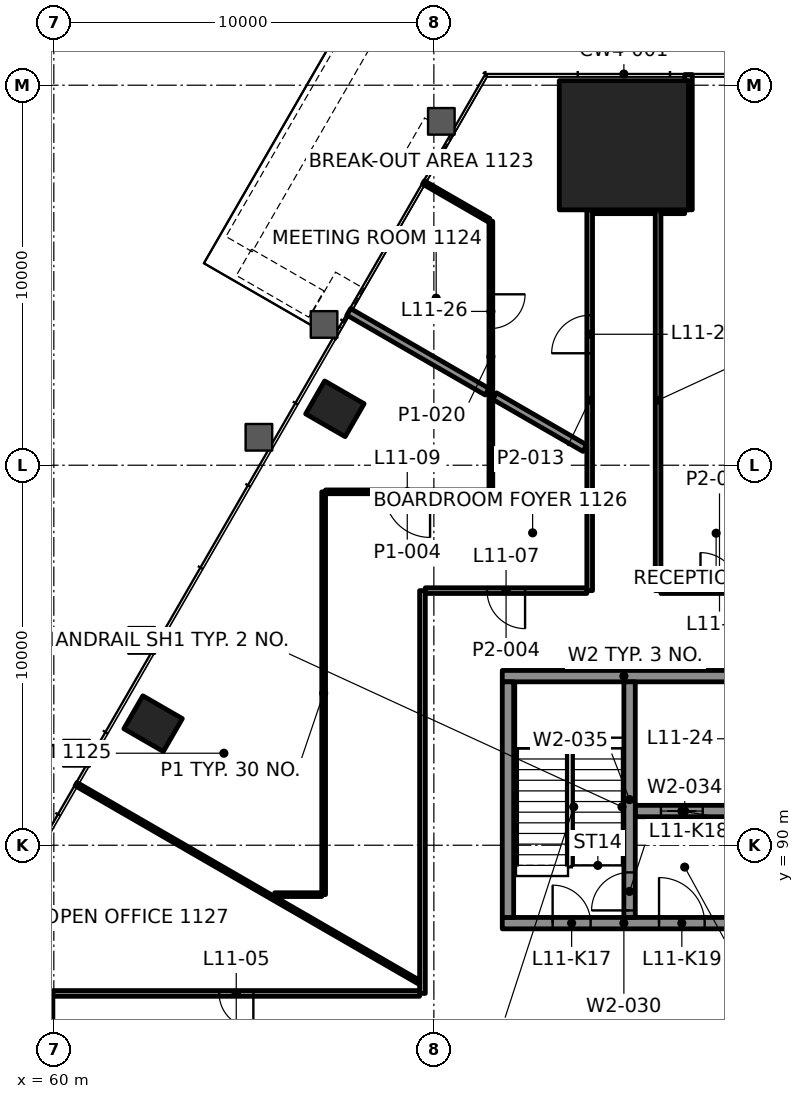
"""IFC4 building model, lengths in metres.
Left out: names, types, materials, properties, quantities, classifications, styles, units other than length and angle.
Written with IfcOpenShell. Run it as: python <this file> out.ifc"""

import sys

from ifc_helpers import new_model, si_unit, direction, frame, frame_2d, origin, origin_2d, place, context, subcontext, project, spatial, rectangle, extrude, element, fill, save


model = new_model("IFC4")
c1 = context("Model", 3, precision=1e-05, world=origin(), true_north=direction((0.0, 1.0)))
c2 = subcontext(c1, "Body", "Model", "MODEL_VIEW")
j1 = project(units=[si_unit("LENGTHUNIT", "METRE"), si_unit("PLANEANGLEUNIT", "RADIAN")], contexts=[c1])
p1 = place(None, origin())
s1 = spatial("IfcSite", under=j1, at=p1, CompositionType="ELEMENT")
p2 = place(p1, origin())
s2 = spatial("IfcBuilding", under=s1, at=p2, CompositionType="ELEMENT")
p3 = place(p2, frame((0.0, 0.0, 52.6)))
s3 = spatial("IfcBuildingStorey", under=s2, at=p3, CompositionType="ELEMENT", Elevation=52.6)
p4 = place(p3, frame((75.0, 108.42, 0.0), z_axis=(0.0, 0.0, 1.0), x_axis=(-1.0, 0.0, 0.0)))
e1 = element("IfcColumn", 1, at=p4, inside=s3, PredefinedType="COLUMN", context=c2, shape_type="SweptSolid", body=[
    extrude(rectangle(XDim=3.4, YDim=3.4, at=origin_2d()), origin(), (0.0, 0.0, 1.0), 4.2),
])
for number, where, z_axis, x_axis in (
    (2, (67.396, 101.485, -0.0), (0.0, 0.0, 1.0), (-0.5, -0.866, 0.0)),
    (3, (62.612, 93.199, -0.0), (0.0, 0.0, 1.0), (-0.5, -0.866, 0.0)),
):
    element("IfcColumn", number, at=place(p3, frame(where, z_axis=z_axis, x_axis=x_axis)), inside=s3, PredefinedType="COLUMN", context=c2, shape_type="SweptSolid", body=[
        extrude(rectangle(XDim=1.0, YDim=1.2, at=origin_2d()), origin(), (0.0, 0.0, 1.0), 4.2),
    ])
p5 = place(p3, frame((71.8, 87.95, 0.0), z_axis=(0.0, 0.0, 1.0), x_axis=(1.0, 0.0, 0.0)))
e4 = element("IfcWall", 4, at=p5, inside=s3, PredefinedType="SHEAR", context=c2, shape_type="SweptSolid", body=[
    extrude(rectangle(XDim=6.4, YDim=0.3, at=frame_2d((3.2, 0.0))), origin(), (0.0, 0.0, 1.0), 4.0),
])
p6 = place(p5, frame((1.325, 0.0, 0.0)))
e5 = element("IfcOpeningElement", 5, at=p6, cuts=e4, PredefinedType="OPENING", context=c2, shape_type="SweptSolid", body=[
    extrude(rectangle(XDim=1.0, YDim=2.1, at=frame_2d((0.5, 1.05))), frame((0.0, 0.16, 0.0), z_axis=(0.0, -1.0, 0.0), x_axis=(1.0, 0.0, 0.0)), (0.0, 0.0, 1.0), 0.32),
])
p7 = place(p5, frame((4.125, 0.0, 0.0)))
e6 = element("IfcOpeningElement", 6, at=p7, cuts=e4, PredefinedType="OPENING", context=c2, shape_type="SweptSolid", body=[
    extrude(rectangle(XDim=1.2, YDim=2.1, at=frame_2d((0.6, 1.05))), frame((0.0, 0.16, 0.0), z_axis=(0.0, -1.0, 0.0), x_axis=(1.0, 0.0, 0.0)), (0.0, 0.0, 1.0), 0.32),
])
p8 = place(p3, frame((71.8, 94.45, 0.0), z_axis=(0.0, 0.0, 1.0), x_axis=(1.0, 0.0, 0.0)))
e7 = element("IfcWall", 7, at=p8, inside=s3, PredefinedType="SHEAR", context=c2, shape_type="SweptSolid", body=[
    extrude(rectangle(XDim=6.4, YDim=0.3, at=frame_2d((3.2, 0.0))), origin(), (0.0, 0.0, 1.0), 4.0),
])
p9 = place(p3, frame((71.95, 88.1, 0.0), z_axis=(0.0, 0.0, 1.0), x_axis=(0.0, 1.0, 0.0)))
e8 = element("IfcWall", 8, at=p9, inside=s3, PredefinedType="SHEAR", context=c2, shape_type="SweptSolid", body=[
    extrude(rectangle(XDim=6.2, YDim=0.3, at=frame_2d((3.1, 0.0))), origin(), (0.0, 0.0, 1.0), 4.0),
])
p10 = place(p3, frame((75.3, 90.9, 0.0), z_axis=(0.0, 0.0, 1.0), x_axis=(1.0, 0.0, 0.0)))
e9 = element("IfcWall", 9, at=p10, inside=s3, PredefinedType="SHEAR", context=c2, shape_type="SweptSolid", body=[
    extrude(rectangle(XDim=2.6, YDim=0.3, at=frame_2d((1.3, 0.0))), origin(), (0.0, 0.0, 1.0), 4.0),
])
p11 = place(p10, frame((0.675, 0.0, 0.0)))
e10 = element("IfcOpeningElement", 10, at=p11, cuts=e9, PredefinedType="OPENING", context=c2, shape_type="SweptSolid", body=[
    extrude(rectangle(XDim=1.1, YDim=2.1, at=frame_2d((0.55, 1.05))), frame((0.0, 0.16, 0.0), z_axis=(0.0, -1.0, 0.0), x_axis=(1.0, 0.0, 0.0)), (0.0, 0.0, 1.0), 0.32),
])
p12 = place(p3, frame((75.15, 88.1, 0.0), z_axis=(0.0, 0.0, 1.0), x_axis=(0.0, 1.0, 0.0)))
e11 = element("IfcWall", 11, at=p12, inside=s3, PredefinedType="SHEAR", context=c2, shape_type="SweptSolid", body=[
    extrude(rectangle(XDim=6.2, YDim=0.3, at=frame_2d((3.1, 0.0))), origin(), (0.0, 0.0, 1.0), 4.0),
])
p13 = place(p12, frame((0.185, 0.0, 0.0)))
e12 = element("IfcOpeningElement", 12, at=p13, cuts=e11, PredefinedType="OPENING", context=c2, shape_type="SweptSolid", body=[
    extrude(rectangle(XDim=1.0, YDim=2.1, at=frame_2d((0.5, 1.05))), frame((0.0, 0.16, 0.0), z_axis=(0.0, -1.0, 0.0), x_axis=(1.0, 0.0, 0.0)), (0.0, 0.0, 1.0), 0.32),
])
p14 = place(p3, frame((69.625, 86.1, 0.0), z_axis=(0.0, 0.0, 1.0), x_axis=(-1.0, 0.0, 0.0)))
e13 = element("IfcWall", 13, at=p14, inside=s3, PredefinedType="PARTITIONING", context=c2, shape_type="SweptSolid", body=[
    extrude(rectangle(XDim=9.649, YDim=0.15, at=frame_2d((4.825, 0.0))), origin(), (0.0, 0.0, 1.0), 3.4),
])
p15 = place(p14, frame((4.375, 0.0, 0.0)))
e14 = element("IfcOpeningElement", 14, at=p15, cuts=e13, PredefinedType="OPENING", context=c2, shape_type="SweptSolid", body=[
    extrude(rectangle(XDim=0.9, YDim=2.1, at=frame_2d((0.45, 1.05))), frame((0.0, 0.085, 0.0), z_axis=(0.0, -1.0, 0.0), x_axis=(1.0, 0.0, 0.0)), (0.0, 0.0, 1.0), 0.17),
])
p16 = place(p3, frame((65.812, 88.7, 0.0), z_axis=(0.0, 0.0, 1.0), x_axis=(1.0, 0.0, 0.0)))
e15 = element("IfcWall", 15, at=p16, inside=s3, PredefinedType="PARTITIONING", context=c2, shape_type="SweptSolid", body=[
    extrude(rectangle(XDim=1.238, YDim=0.1, at=frame_2d((0.619, 0.0))), origin(), (0.0, 0.0, 1.0), 3.4),
])
p17 = place(p3, frame((74.025, 96.7, 0.0), z_axis=(0.0, 0.0, 1.0), x_axis=(-1.0, 0.0, 0.0)))
e16 = element("IfcWall", 16, at=p17, inside=s3, PredefinedType="PARTITIONING", context=c2, shape_type="SweptSolid", body=[
    extrude(rectangle(XDim=4.25, YDim=0.15, at=frame_2d((2.125, 0.0))), origin(), (0.0, 0.0, 1.0), 3.4),
])
p18 = place(p17, frame((1.625, 0.0, 0.0)))
e17 = element("IfcOpeningElement", 17, at=p18, cuts=e16, PredefinedType="OPENING", context=c2, shape_type="SweptSolid", body=[
    extrude(rectangle(XDim=1.0, YDim=2.1, at=frame_2d((0.5, 1.05))), frame((0.0, 0.085, 0.0), z_axis=(0.0, -1.0, 0.0), x_axis=(1.0, 0.0, 0.0)), (0.0, 0.0, 1.0), 0.17),
])
p19 = place(p3, frame((75.975, 96.7, 0.0), z_axis=(0.0, 0.0, 1.0), x_axis=(1.0, 0.0, 0.0)))
e18 = element("IfcWall", 18, at=p19, inside=s3, PredefinedType="PARTITIONING", context=c2, shape_type="SweptSolid", body=[
    extrude(rectangle(XDim=3.082, YDim=0.15, at=frame_2d((1.541, 0.0))), origin(), (0.0, 0.0, 1.0), 3.4),
])
p20 = place(p19, frame((1.041, 0.0, 0.0)))
e19 = element("IfcOpeningElement", 19, at=p20, cuts=e18, PredefinedType="OPENING", context=c2, shape_type="SweptSolid", body=[
    extrude(rectangle(XDim=1.0, YDim=2.1, at=frame_2d((0.5, 1.05))), frame((0.0, 0.085, 0.0), z_axis=(0.0, -1.0, 0.0), x_axis=(1.0, 0.0, 0.0)), (0.0, 0.0, 1.0), 0.17),
])
p21 = place(p3, frame((71.45, 99.3, 0.0), z_axis=(0.0, 0.0, 1.0), x_axis=(-1.0, 0.0, 0.0)))
e20 = element("IfcWall", 20, at=p21, inside=s3, PredefinedType="PARTITIONING", context=c2, shape_type="SweptSolid", body=[
    extrude(rectangle(XDim=4.3, YDim=0.1, at=frame_2d((2.15, 0.0))), origin(), (0.0, 0.0, 1.0), 3.4),
])
p22 = place(p21, frame((1.55, 0.0, 0.0)))
e21 = element("IfcOpeningElement", 21, at=p22, cuts=e20, PredefinedType="OPENING", context=c2, shape_type="SweptSolid", body=[
    extrude(rectangle(XDim=1.2, YDim=2.1, at=frame_2d((0.6, 1.05))), frame((0.0, 0.06, 0.0), z_axis=(0.0, -1.0, 0.0), x_axis=(1.0, 0.0, 0.0)), (0.0, 0.0, 1.0), 0.12),
])
p23 = place(p3, frame((74.176, 106.72, 0.0), z_axis=(0.0, 0.0, 1.0), x_axis=(1.0, 0.0, 0.0)))
e22 = element("IfcWall", 22, at=p23, inside=s3, PredefinedType="PARTITIONING", context=c2, shape_type="SweptSolid", body=[
    extrude(rectangle(XDim=1.649, YDim=0.2, at=frame_2d((0.825, 0.0))), origin(), (0.0, 0.0, 1.0), 3.397),
])
p24 = place(p3, frame((76.7, 106.721, 0.0), z_axis=(0.0, 0.0, 1.0), x_axis=(0.0, 1.0, 0.0)))
e23 = element("IfcWall", 23, at=p24, inside=s3, PredefinedType="PARTITIONING", context=c2, shape_type="SweptSolid", body=[
    extrude(rectangle(XDim=3.56, YDim=0.2, at=frame_2d((1.78, 0.0))), origin(), (0.0, 0.0, 1.0), 3.4),
])
p25 = place(p3, frame((75.9, 96.7, 0.0), z_axis=(0.0, 0.0, 1.0), x_axis=(0.0, 1.0, 0.0)))
e24 = element("IfcWall", 24, at=p25, inside=s3, PredefinedType="PARTITIONING", context=c2, shape_type="SweptSolid", body=[
    extrude(rectangle(XDim=10.02, YDim=0.15, at=frame_2d((5.01, 0.0))), origin(), (0.0, 0.0, 1.0), 3.4),
])
p26 = place(p3, frame((74.1, 96.7, 0.0), z_axis=(0.0, 0.0, 1.0), x_axis=(0.0, 1.0, 0.0)))
e25 = element("IfcWall", 25, at=p26, inside=s3, PredefinedType="PARTITIONING", context=c2, shape_type="SweptSolid", body=[
    extrude(rectangle(XDim=10.02, YDim=0.15, at=frame_2d((5.01, 0.0))), origin(), (0.0, 0.0, 1.0), 3.4),
])
p27 = place(p26, frame((6.246, 0.0, 0.0)))
e26 = element("IfcOpeningElement", 26, at=p27, cuts=e25, PredefinedType="OPENING", context=c2, shape_type="SweptSolid", body=[
    extrude(rectangle(XDim=1.0, YDim=2.1, at=frame_2d((0.5, 1.05))), frame((0.0, 0.085, 0.0), z_axis=(0.0, -1.0, 0.0), x_axis=(1.0, 0.0, 0.0)), (0.0, 0.0, 1.0), 0.17),
])
p28 = place(p3, frame((71.5, 106.418, 0.0), z_axis=(0.0, 0.0, 1.0), x_axis=(0.0, -1.0, 0.0)))
e27 = element("IfcWall", 27, at=p28, inside=s3, PredefinedType="PARTITIONING", context=c2, shape_type="SweptSolid", body=[
    extrude(rectangle(XDim=7.118, YDim=0.1, at=frame_2d((3.559, 0.0))), origin(), (0.0, 0.0, 1.0), 3.4),
])
p29 = place(p28, frame((1.921, 0.0, 0.0)))
e28 = element("IfcOpeningElement", 28, at=p29, cuts=e27, PredefinedType="OPENING", context=c2, shape_type="SweptSolid", body=[
    extrude(rectangle(XDim=0.9, YDim=2.1, at=frame_2d((0.45, 1.05))), frame((0.0, 0.06, 0.0), z_axis=(0.0, -1.0, 0.0), x_axis=(1.0, 0.0, 0.0)), (0.0, 0.0, 1.0), 0.12),
])
p30 = place(p3, frame((69.7, 86.1, 0.0), z_axis=(0.0, 0.0, 1.0), x_axis=(0.0, 1.0, 0.0)))
e29 = element("IfcWall", 29, at=p30, inside=s3, PredefinedType="PARTITIONING", context=c2, shape_type="SweptSolid", body=[
    extrude(rectangle(XDim=10.6, YDim=0.15, at=frame_2d((5.3, 0.0))), origin(), (0.0, 0.0, 1.0), 3.4),
])
p31 = place(p3, frame((67.1, 88.7, 0.0), z_axis=(0.0, 0.0, 1.0), x_axis=(0.0, 1.0, 0.0)))
e30 = element("IfcWall", 30, at=p31, inside=s3, PredefinedType="PARTITIONING", context=c2, shape_type="SweptSolid", body=[
    extrude(rectangle(XDim=10.6, YDim=0.1, at=frame_2d((5.3, 0.0))), origin(), (0.0, 0.0, 1.0), 3.4),
])
p32 = place(p3, frame((59.9, 67.321, 0.0), z_axis=(0.0, 0.0, 1.0), x_axis=(0.0, 1.0, 0.0)))
e31 = element("IfcWall", 31, at=p32, inside=s3, PredefinedType="PARTITIONING", context=c2, shape_type="SweptSolid", body=[
    extrude(rectangle(XDim=18.778, YDim=0.15, at=frame_2d((9.389, 0.0))), origin(), (0.0, 0.0, 1.0), 3.4),
])
p33 = place(p32, frame((3.519, 0.0, 0.0)))
e32 = element("IfcOpeningElement", 32, at=p33, cuts=e31, PredefinedType="OPENING", context=c2, shape_type="SweptSolid", body=[
    extrude(rectangle(XDim=0.9, YDim=2.1, at=frame_2d((0.45, 1.05))), frame((0.0, 0.085, 0.0), z_axis=(0.0, -1.0, 0.0), x_axis=(1.0, 0.0, 0.0)), (0.0, 0.0, 1.0), 0.17),
])
p34 = place(p32, frame((6.281, 0.0, 0.0)))
e33 = element("IfcOpeningElement", 33, at=p34, cuts=e31, PredefinedType="OPENING", context=c2, shape_type="SweptSolid", body=[
    extrude(rectangle(XDim=0.9, YDim=2.1, at=frame_2d((0.45, 1.05))), frame((0.0, 0.085, 0.0), z_axis=(0.0, -1.0, 0.0), x_axis=(1.0, 0.0, 0.0)), (0.0, 0.0, 1.0), 0.17),
])
p35 = place(p32, frame((9.042, 0.0, 0.0)))
e34 = element("IfcOpeningElement", 34, at=p35, cuts=e31, PredefinedType="OPENING", context=c2, shape_type="SweptSolid", body=[
    extrude(rectangle(XDim=0.9, YDim=2.1, at=frame_2d((0.45, 1.05))), frame((0.0, 0.085, 0.0), z_axis=(0.0, -1.0, 0.0), x_axis=(1.0, 0.0, 0.0)), (0.0, 0.0, 1.0), 0.17),
])
p36 = place(p3, frame((71.45, 106.447, 0.0), z_axis=(0.0, 0.0, 1.0), x_axis=(-0.866022120267, 0.500005687176, 0.0)))
e35 = element("IfcWall", 35, at=p36, inside=s3, PredefinedType="PARTITIONING", context=c2, shape_type="SweptSolid", body=[
    extrude(rectangle(XDim=1.99, YDim=0.1, at=frame_2d((0.995, 0.0))), origin(), (0.0, 0.0, 1.0), 3.4),
])
p37 = place(p3, frame((73.973, 100.449, 0.0), z_axis=(0.0, 0.0, 1.0), x_axis=(-0.866035715982, 0.499982138324, 0.0)))
e36 = element("IfcWall", 36, at=p37, inside=s3, PredefinedType="PARTITIONING", context=c2, shape_type="SweptSolid", body=[
    extrude(rectangle(XDim=2.74, YDim=0.2, at=frame_2d((1.37, 0.0))), origin(), (0.0, 0.0, 1.0), 3.4),
])
p38 = place(p3, frame((69.599, 86.404, 0.0), z_axis=(0.0, 0.0, 1.0), x_axis=(-0.866034815185, 0.499983698621, 0.0)))
e37 = element("IfcWall", 37, at=p38, inside=s3, PredefinedType="PARTITIONING", context=c2, shape_type="SweptSolid", body=[
    extrude(rectangle(XDim=10.408, YDim=0.1, at=frame_2d((5.204, 0.0))), origin(), (0.0, 0.0, 1.0), 3.165),
])
p39 = place(p3, frame((75.975, 106.72, 0.0), z_axis=(0.0, 0.0, 1.0), x_axis=(1.0, 0.0, 0.0)))
e38 = element("IfcWall", 38, at=p39, inside=s3, PredefinedType="PARTITIONING", context=c2, shape_type="SweptSolid", body=[
    extrude(rectangle(XDim=0.625, YDim=0.2, at=frame_2d((0.312, 0.0))), origin(), (0.0, 0.0, 1.0), 3.4),
])
p40 = place(p3, frame((71.4, 101.935, 0.0), z_axis=(0.0, 0.0, 1.0), x_axis=(-0.866003715822, 0.500037562771, 0.0)))
e39 = element("IfcWall", 39, at=p40, inside=s3, PredefinedType="PARTITIONING", context=c2, shape_type="SweptSolid", body=[
    extrude(rectangle(XDim=4.203, YDim=0.2, at=frame_2d((2.102, 0.0))), origin(), (0.0, 0.0, 1.0), 3.4),
])
p41 = place(p3, frame((69.117, 113.166, 0.0), z_axis=(0.0, 0.0, 1.0), x_axis=(-0.5000081092, -0.866020721885, 0.0)))
e40 = element("IfcWall", 40, at=p41, inside=s3, PredefinedType="SOLIDWALL", context=c2, shape_type="SweptSolid", body=[
    extrude(rectangle(XDim=8.483, YDim=0.8, at=frame_2d((4.242, 0.0))), origin(), (0.0, 0.0, 1.0), 0.9),
])
p42 = place(p3, frame((65.003, 105.341, 0.0), z_axis=(0.0, 0.0, 1.0), x_axis=(0.866008176907, -0.50002983664, 0.0)))
e41 = element("IfcWall", 41, at=p42, inside=s3, PredefinedType="SOLIDWALL", context=c2, shape_type="SweptSolid", body=[
    extrude(rectangle(XDim=2.2, YDim=0.8, at=frame_2d((1.1, 0.0))), origin(), (0.0, 0.0, 1.0), 0.9),
])
p43 = place(p15, origin())
e42 = element("IfcDoor", 42, at=p43, inside=s3, OperationType="SINGLE_SWING_LEFT", PredefinedType="DOOR", context=c2, shape_type="SweptSolid", body=[
    extrude(rectangle(XDim=0.9, YDim=2.1, at=frame_2d((0.45, 1.05))), frame((0.0, 0.025, 0.0), z_axis=(0.0, -1.0, 0.0), x_axis=(1.0, 0.0, 0.0)), (0.0, 0.0, 1.0), 0.05),
])
fill(e14, e42)
p44 = place(p18, origin())
e43 = element("IfcDoor", 43, at=p44, inside=s3, OperationType="SINGLE_SWING_RIGHT", PredefinedType="DOOR", context=c2, shape_type="SweptSolid", body=[
    extrude(rectangle(XDim=1.0, YDim=2.1, at=frame_2d((0.5, 1.05))), frame((0.0, 0.025, 0.0), z_axis=(0.0, -1.0, 0.0), x_axis=(1.0, 0.0, 0.0)), (0.0, 0.0, 1.0), 0.05),
])
fill(e17, e43)
p45 = place(p20, origin())
e44 = element("IfcDoor", 44, at=p45, inside=s3, OperationType="SINGLE_SWING_LEFT", PredefinedType="DOOR", context=c2, shape_type="SweptSolid", body=[
    extrude(rectangle(XDim=1.0, YDim=2.1, at=frame_2d((0.5, 1.05))), frame((0.0, 0.025, 0.0), z_axis=(0.0, -1.0, 0.0), x_axis=(1.0, 0.0, 0.0)), (0.0, 0.0, 1.0), 0.05),
])
fill(e19, e44)
p46 = place(p22, origin())
e45 = element("IfcDoor", 45, at=p46, inside=s3, OperationType="DOUBLE_DOOR_SINGLE_SWING", PredefinedType="DOOR", context=c2, shape_type="SweptSolid", body=[
    extrude(rectangle(XDim=1.2, YDim=2.1, at=frame_2d((0.6, 1.05))), frame((0.0, 0.025, 0.0), z_axis=(0.0, -1.0, 0.0), x_axis=(1.0, 0.0, 0.0)), (0.0, 0.0, 1.0), 0.05),
])
fill(e21, e45)
p47 = place(p27, origin())
e46 = element("IfcDoor", 46, at=p47, inside=s3, OperationType="SINGLE_SWING_RIGHT", PredefinedType="DOOR", context=c2, shape_type="SweptSolid", body=[
    extrude(rectangle(XDim=1.0, YDim=2.1, at=frame_2d((0.5, 1.05))), frame((0.0, 0.025, 0.0), z_axis=(0.0, -1.0, 0.0), x_axis=(1.0, 0.0, 0.0)), (0.0, 0.0, 1.0), 0.05),
])
fill(e26, e46)
p48 = place(p29, origin())
e47 = element("IfcDoor", 47, at=p48, inside=s3, OperationType="SINGLE_SWING_RIGHT", PredefinedType="DOOR", context=c2, shape_type="SweptSolid", body=[
    extrude(rectangle(XDim=0.9, YDim=2.1, at=frame_2d((0.45, 1.05))), frame((0.0, 0.025, 0.0), z_axis=(0.0, -1.0, 0.0), x_axis=(1.0, 0.0, 0.0)), (0.0, 0.0, 1.0), 0.05),
])
fill(e28, e47)
p49 = place(p11, origin())
e48 = element("IfcDoor", 48, at=p49, inside=s3, OperationType="DOUBLE_DOOR_SLIDING", PredefinedType="DOOR", context=c2, shape_type="SweptSolid", body=[
    extrude(rectangle(XDim=1.1, YDim=2.1, at=frame_2d((0.55, 1.05))), frame((0.0, 0.025, 0.0), z_axis=(0.0, -1.0, 0.0), x_axis=(1.0, 0.0, 0.0)), (0.0, 0.0, 1.0), 0.05),
])
fill(e10, e48)
p50 = place(p6, origin())
e49 = element("IfcDoor", 49, at=p50, inside=s3, OperationType="SINGLE_SWING_RIGHT", PredefinedType="DOOR", context=c2, shape_type="SweptSolid", body=[
    extrude(rectangle(XDim=1.0, YDim=2.1, at=frame_2d((0.5, 1.05))), frame((0.0, 0.025, 0.0), z_axis=(0.0, -1.0, 0.0), x_axis=(1.0, 0.0, 0.0)), (0.0, 0.0, 1.0), 0.05),
])
fill(e5, e49)
p51 = place(p13, origin())
e50 = element("IfcDoor", 50, at=p51, inside=s3, OperationType="SINGLE_SWING_LEFT", PredefinedType="DOOR", context=c2, shape_type="SweptSolid", body=[
    extrude(rectangle(XDim=1.0, YDim=2.1, at=frame_2d((0.5, 1.05))), frame((0.0, 0.025, 0.0), z_axis=(0.0, -1.0, 0.0), x_axis=(1.0, 0.0, 0.0)), (0.0, 0.0, 1.0), 0.05),
])
fill(e12, e50)
p52 = place(p7, origin())
e51 = element("IfcDoor", 51, at=p52, inside=s3, OperationType="SINGLE_SWING_RIGHT", PredefinedType="DOOR", context=c2, shape_type="SweptSolid", body=[
    extrude(rectangle(XDim=1.2, YDim=2.1, at=frame_2d((0.6, 1.05))), frame((0.0, 0.025, 0.0), z_axis=(0.0, -1.0, 0.0), x_axis=(1.0, 0.0, 0.0)), (0.0, 0.0, 1.0), 0.05),
])
fill(e6, e51)
save(model, sys.argv[1])
